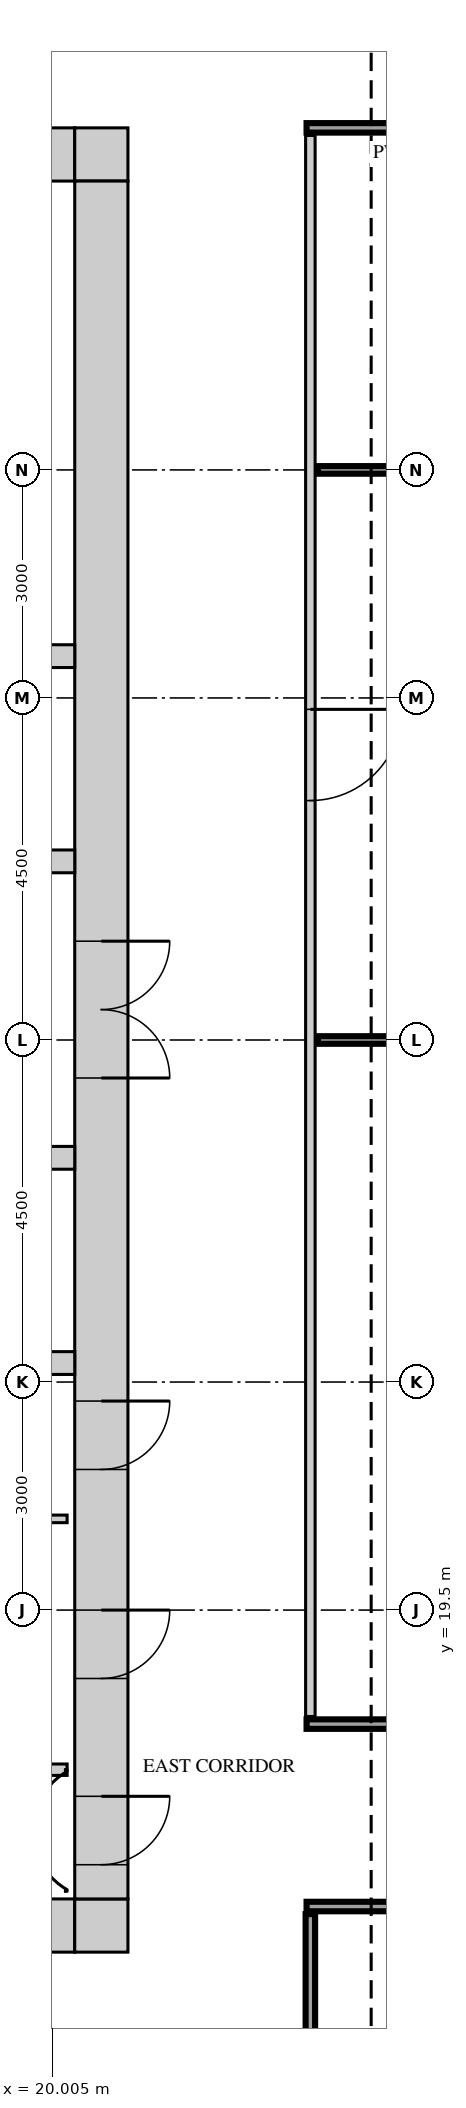
"""IFC4 building model, lengths in metres.
Left out: names, types, materials, properties, quantities, classifications, styles, units other than length and angle.
Written with IfcOpenShell. Run it as: python <this file> out.ifc"""

import sys

from ifc_helpers import new_model, si_unit, direction, frame, frame_2d, origin, place, context, subcontext, project, spatial, rectangle, extrude, source, transform, mapped, element, fill, save


model = new_model("IFC4")
c1 = context("Model", 3, precision=1e-05, world=origin(), true_north=direction((0.0, 1.0)))
c2 = subcontext(c1, "Body", "Model", "MODEL_VIEW")
j1 = project(units=[si_unit("LENGTHUNIT", "METRE"), si_unit("PLANEANGLEUNIT", "RADIAN")], contexts=[c1])
p1 = place(None, origin())
s1 = spatial("IfcSite", under=j1, at=p1, CompositionType="ELEMENT")
p2 = place(p1, origin())
s2 = spatial("IfcBuilding", under=s1, at=p2, CompositionType="ELEMENT")
p3 = place(p2, frame((0.0, 0.0, 246.2)))
s3 = spatial("IfcBuildingStorey", under=s2, at=p3, CompositionType="ELEMENT", Elevation=246.2)
m1 = source(origin(), c2, "Body", "SweptSolid", [
    extrude(rectangle(XDim=13.6, YDim=0.7, at=frame_2d((6.8, 0.0))), origin(), (0.0, 0.0, 1.0), 3.75),
])
p4 = place(p3, frame((6.7, 38.65, 0.0), z_axis=(0.0, 0.0, 1.0), x_axis=(1.0, 0.0, 0.0)))
e1 = element("IfcWall", 1, at=p4, inside=s3, PredefinedType="SHEAR", context=c2, shape_type="MappedRepresentation", body=[
    mapped(m1, transform((0.0, 0.0, 0.0))),
])
m2 = source(origin(), c2, "Body", "SweptSolid", [
    extrude(rectangle(XDim=0.9, YDim=2.1, at=frame_2d((0.45, 1.05))), frame((0.0, 0.36, 0.0), z_axis=(0.0, -1.0, 0.0), x_axis=(1.0, 0.0, 0.0)), (0.0, 0.0, 1.0), 0.72),
])
p5 = place(p4, frame((3.0, 0.0, 0.0)))
e2 = element("IfcOpeningElement", 2, at=p5, cuts=e1, PredefinedType="OPENING", context=c2, shape_type="MappedRepresentation", body=[
    mapped(m2, transform((0.0, 0.0, 0.0))),
])
p6 = place(p4, frame((9.7, 0.0, 0.0)))
e3 = element("IfcOpeningElement", 3, at=p6, cuts=e1, PredefinedType="OPENING", context=c2, shape_type="MappedRepresentation", body=[
    mapped(m2, transform((0.0, 0.0, 0.0))),
])
m3 = source(origin(), c2, "Body", "SweptSolid", [
    extrude(rectangle(XDim=0.7, YDim=0.7, at=frame_2d((0.35, 0.0))), origin(), (0.0, 0.0, 1.0), 3.75),
])
p7 = place(p3, frame((20.3, 38.65, 0.0), z_axis=(0.0, 0.0, 1.0), x_axis=(1.0, 0.0, 0.0)))
e4 = element("IfcWall", 4, at=p7, inside=s3, PredefinedType="SHEAR", context=c2, shape_type="MappedRepresentation", body=[
    mapped(m3, transform((0.0, 0.0, 0.0))),
])
p8 = place(p3, frame((6.7, 15.35, 0.0), z_axis=(0.0, 0.0, 1.0), x_axis=(1.0, 0.0, 0.0)))
e5 = element("IfcWall", 5, at=p8, inside=s3, PredefinedType="SHEAR", context=c2, shape_type="MappedRepresentation", body=[
    mapped(m1, transform((0.0, 0.0, 0.0))),
])
m4 = source(origin(), c2, "Body", "SweptSolid", [
    extrude(rectangle(XDim=1.2, YDim=2.1, at=frame_2d((0.6, 1.05))), frame((0.0, 0.36, 0.0), z_axis=(0.0, -1.0, 0.0), x_axis=(1.0, 0.0, 0.0)), (0.0, 0.0, 1.0), 0.72),
])
p9 = place(p8, frame((5.5, 0.0, 0.0)))
e6 = element("IfcOpeningElement", 6, at=p9, cuts=e5, PredefinedType="OPENING", context=c2, shape_type="MappedRepresentation", body=[
    mapped(m4, transform((0.0, 0.0, 0.0))),
])
p10 = place(p8, frame((2.15, 0.0, 0.0)))
e7 = element("IfcOpeningElement", 7, at=p10, cuts=e5, PredefinedType="OPENING", context=c2, shape_type="MappedRepresentation", body=[
    mapped(m4, transform((0.0, 0.0, 0.0))),
])
m5 = source(origin(), c2, "Body", "SweptSolid", [
    extrude(rectangle(XDim=1.0, YDim=2.1, at=frame_2d((0.5, 1.05))), frame((0.0, 0.36, 0.0), z_axis=(0.0, -1.0, 0.0), x_axis=(1.0, 0.0, 0.0)), (0.0, 0.0, 1.0), 0.72),
])
p11 = place(p8, frame((8.0, 0.0, 0.0)))
e8 = element("IfcOpeningElement", 8, at=p11, cuts=e5, PredefinedType="OPENING", context=c2, shape_type="MappedRepresentation", body=[
    mapped(m5, transform((0.0, 0.0, 0.0))),
])
p12 = place(p3, frame((20.3, 15.35, 0.0), z_axis=(0.0, 0.0, 1.0), x_axis=(1.0, 0.0, 0.0)))
e9 = element("IfcWall", 9, at=p12, inside=s3, PredefinedType="SHEAR", context=c2, shape_type="MappedRepresentation", body=[
    mapped(m3, transform((0.0, 0.0, 0.0))),
])
m6 = source(origin(), c2, "Body", "SweptSolid", [
    extrude(rectangle(XDim=22.6, YDim=0.7, at=frame_2d((11.3, 0.0))), origin(), (0.0, 0.0, 1.0), 3.75),
])
p13 = place(p3, frame((20.65, 15.7, 0.0), z_axis=(0.0, 0.0, 1.0), x_axis=(0.0, 1.0, 0.0)))
e10 = element("IfcWall", 10, at=p13, inside=s3, PredefinedType="SHEAR", context=c2, shape_type="MappedRepresentation", body=[
    mapped(m6, transform((0.0, 0.0, 0.0))),
])
m7 = source(origin(), c2, "Body", "SweptSolid", [
    extrude(rectangle(XDim=1.8, YDim=2.1, at=frame_2d((0.9, 1.05))), frame((0.0, 0.36, 0.0), z_axis=(0.0, -1.0, 0.0), x_axis=(1.0, 0.0, 0.0)), (0.0, 0.0, 1.0), 0.72),
])
p14 = place(p13, frame((10.8, 0.0, 0.0)))
e11 = element("IfcOpeningElement", 11, at=p14, cuts=e10, PredefinedType="OPENING", context=c2, shape_type="MappedRepresentation", body=[
    mapped(m7, transform((0.0, 0.0, 0.0))),
])
p15 = place(p13, frame((0.45, 0.0, 0.0)))
e12 = element("IfcOpeningElement", 12, at=p15, cuts=e10, PredefinedType="OPENING", context=c2, shape_type="MappedRepresentation", body=[
    mapped(m2, transform((0.0, 0.0, 0.0))),
])
p16 = place(p13, frame((2.9, 0.0, 0.0)))
e13 = element("IfcOpeningElement", 13, at=p16, cuts=e10, PredefinedType="OPENING", context=c2, shape_type="MappedRepresentation", body=[
    mapped(m2, transform((0.0, 0.0, 0.0))),
])
p17 = place(p13, frame((5.65, 0.0, 0.0)))
e14 = element("IfcOpeningElement", 14, at=p17, cuts=e10, PredefinedType="OPENING", context=c2, shape_type="MappedRepresentation", body=[
    mapped(m2, transform((0.0, 0.0, 0.0))),
])
m8 = source(origin(), c2, "Body", "SweptSolid", [
    extrude(rectangle(XDim=13.6, YDim=0.3, at=frame_2d((6.8, 0.0))), origin(), (0.0, 0.0, 1.0), 3.75),
])
for number, where, z_axis, x_axis in (
    (15, (6.7, 22.75, 0.0), (0.0, 0.0, 1.0), (1.0, 0.0, 0.0)),
    (16, (6.7, 32.05, 0.0), (0.0, 0.0, 1.0), (1.0, 0.0, 0.0)),
):
    element("IfcWall", number, at=place(p3, frame(where, z_axis=z_axis, x_axis=x_axis)), inside=s3, PredefinedType="STANDARD", context=c2, shape_type="MappedRepresentation", body=[
        mapped(m8, transform((0.0, 0.0, 0.0))),
    ])
p18 = place(p3, frame((6.7, 29.35, 0.0), z_axis=(0.0, 0.0, 1.0), x_axis=(1.0, 0.0, 0.0)))
e17 = element("IfcWall", 17, at=p18, inside=s3, PredefinedType="STANDARD", context=c2, shape_type="MappedRepresentation", body=[
    mapped(m8, transform((0.0, 0.0, 0.0))),
])
m9 = source(origin(), c2, "Body", "SweptSolid", [
    extrude(rectangle(XDim=1.2, YDim=2.1, at=frame_2d((0.6, 1.05))), frame((0.0, 0.16, 0.0), z_axis=(0.0, -1.0, 0.0), x_axis=(1.0, 0.0, 0.0)), (0.0, 0.0, 1.0), 0.32),
])
p19 = place(p18, frame((1.05, 0.0, 0.0)))
e18 = element("IfcOpeningElement", 18, at=p19, cuts=e17, PredefinedType="OPENING", context=c2, shape_type="MappedRepresentation", body=[
    mapped(m9, transform((0.0, 0.0, 0.0))),
])
p20 = place(p18, frame((3.6, 0.0, 0.0)))
e19 = element("IfcOpeningElement", 19, at=p20, cuts=e17, PredefinedType="OPENING", context=c2, shape_type="MappedRepresentation", body=[
    mapped(m9, transform((0.0, 0.0, 0.0))),
])
p21 = place(p18, frame((6.15, 0.0, 0.0)))
e20 = element("IfcOpeningElement", 20, at=p21, cuts=e17, PredefinedType="OPENING", context=c2, shape_type="MappedRepresentation", body=[
    mapped(m9, transform((0.0, 0.0, 0.0))),
])
p22 = place(p18, frame((8.7, 0.0, 0.0)))
e21 = element("IfcOpeningElement", 21, at=p22, cuts=e17, PredefinedType="OPENING", context=c2, shape_type="MappedRepresentation", body=[
    mapped(m9, transform((0.0, 0.0, 0.0))),
])
p23 = place(p18, frame((11.25, 0.0, 0.0)))
e22 = element("IfcOpeningElement", 22, at=p23, cuts=e17, PredefinedType="OPENING", context=c2, shape_type="MappedRepresentation", body=[
    mapped(m9, transform((0.0, 0.0, 0.0))),
])
p24 = place(p3, frame((6.7, 25.45, 0.0), z_axis=(0.0, 0.0, 1.0), x_axis=(1.0, 0.0, 0.0)))
e23 = element("IfcWall", 23, at=p24, inside=s3, PredefinedType="STANDARD", context=c2, shape_type="MappedRepresentation", body=[
    mapped(m8, transform((0.0, 0.0, 0.0))),
])
p25 = place(p24, frame((1.05, 0.0, 0.0)))
e24 = element("IfcOpeningElement", 24, at=p25, cuts=e23, PredefinedType="OPENING", context=c2, shape_type="MappedRepresentation", body=[
    mapped(m9, transform((0.0, 0.0, 0.0))),
])
p26 = place(p24, frame((3.6, 0.0, 0.0)))
e25 = element("IfcOpeningElement", 25, at=p26, cuts=e23, PredefinedType="OPENING", context=c2, shape_type="MappedRepresentation", body=[
    mapped(m9, transform((0.0, 0.0, 0.0))),
])
p27 = place(p24, frame((6.15, 0.0, 0.0)))
e26 = element("IfcOpeningElement", 26, at=p27, cuts=e23, PredefinedType="OPENING", context=c2, shape_type="MappedRepresentation", body=[
    mapped(m9, transform((0.0, 0.0, 0.0))),
])
p28 = place(p24, frame((8.7, 0.0, 0.0)))
e27 = element("IfcOpeningElement", 27, at=p28, cuts=e23, PredefinedType="OPENING", context=c2, shape_type="MappedRepresentation", body=[
    mapped(m9, transform((0.0, 0.0, 0.0))),
])
p29 = place(p24, frame((11.25, 0.0, 0.0)))
e28 = element("IfcOpeningElement", 28, at=p29, cuts=e23, PredefinedType="OPENING", context=c2, shape_type="MappedRepresentation", body=[
    mapped(m9, transform((0.0, 0.0, 0.0))),
])
m10 = source(origin(), c2, "Body", "SweptSolid", [
    extrude(rectangle(XDim=10.85, YDim=0.125, at=frame_2d((5.425, 0.0))), origin(), (0.0, 0.0, 1.0), 3.8),
])
p30 = place(p3, frame((23.4, 4.65, 0.0), z_axis=(0.0, 0.0, 1.0), x_axis=(0.0, 1.0, 0.0)))
e29 = element("IfcWall", 29, at=p30, inside=s3, PredefinedType="PARTITIONING", context=c2, shape_type="MappedRepresentation", body=[
    mapped(m10, transform((0.0, 0.0, 0.0))),
])
m11 = source(origin(), c2, "Body", "SweptSolid", [
    extrude(rectangle(XDim=0.9, YDim=2.1, at=frame_2d((0.45, 1.05))), frame((0.0, 0.073, 0.0), z_axis=(0.0, -1.0, 0.0), x_axis=(1.0, 0.0, 0.0)), (0.0, 0.0, 1.0), 0.145),
])
p31 = place(p30, frame((4.5, 0.0, 0.0)))
e30 = element("IfcOpeningElement", 30, at=p31, cuts=e29, PredefinedType="OPENING", context=c2, shape_type="MappedRepresentation", body=[
    mapped(m11, transform((0.0, 0.0, 0.0))),
])
m12 = source(origin(), c2, "Body", "SweptSolid", [
    extrude(rectangle(XDim=26.0, YDim=0.125, at=frame_2d((13.0, 0.0))), origin(), (0.0, 0.0, 1.0), 3.8),
])
p32 = place(p3, frame((23.35, 15.6, 0.0), z_axis=(0.0, 0.0, 1.0), x_axis=(1.0, 0.0, 0.0)))
e31 = element("IfcWall", 31, at=p32, inside=s3, PredefinedType="PARTITIONING", context=c2, shape_type="MappedRepresentation", body=[
    mapped(m12, transform((0.0, 0.0, 0.0))),
])
p33 = place(p32, frame((4.05, 0.0, 0.0)))
e32 = element("IfcOpeningElement", 32, at=p33, cuts=e31, PredefinedType="OPENING", context=c2, shape_type="MappedRepresentation", body=[
    mapped(m11, transform((0.0, 0.0, 0.0))),
])
m13 = source(origin(), c2, "Body", "SweptSolid", [
    extrude(rectangle(XDim=1.0, YDim=2.1, at=frame_2d((0.5, 1.05))), frame((0.0, 0.073, 0.0), z_axis=(0.0, -1.0, 0.0), x_axis=(1.0, 0.0, 0.0)), (0.0, 0.0, 1.0), 0.145),
])
p34 = place(p32, frame((6.85, 0.0, 0.0)))
e33 = element("IfcOpeningElement", 33, at=p34, cuts=e31, PredefinedType="OPENING", context=c2, shape_type="MappedRepresentation", body=[
    mapped(m13, transform((0.0, 0.0, 0.0))),
])
p35 = place(p32, frame((9.25, 0.0, 0.0)))
e34 = element("IfcOpeningElement", 34, at=p35, cuts=e31, PredefinedType="OPENING", context=c2, shape_type="MappedRepresentation", body=[
    mapped(m11, transform((0.0, 0.0, 0.0))),
])
m14 = source(origin(), c2, "Body", "SweptSolid", [
    extrude(rectangle(XDim=1.2, YDim=2.1, at=frame_2d((0.6, 1.05))), frame((0.0, 0.073, 0.0), z_axis=(0.0, -1.0, 0.0), x_axis=(1.0, 0.0, 0.0)), (0.0, 0.0, 1.0), 0.145),
])
p36 = place(p32, frame((18.05, 0.0, 0.0)))
e35 = element("IfcOpeningElement", 35, at=p36, cuts=e31, PredefinedType="OPENING", context=c2, shape_type="MappedRepresentation", body=[
    mapped(m14, transform((0.0, 0.0, 0.0))),
])
m15 = source(origin(), c2, "Body", "SweptSolid", [
    extrude(rectangle(XDim=4.0, YDim=0.15, at=frame_2d((2.0, 0.0))), origin(), (0.0, 0.0, 1.0), 3.8),
])
p37 = place(p3, frame((16.2, 17.4, 0.0), z_axis=(0.0, 0.0, 1.0), x_axis=(1.0, 0.0, 0.0)))
e36 = element("IfcWall", 36, at=p37, inside=s3, PredefinedType="PARTITIONING", context=c2, shape_type="MappedRepresentation", body=[
    mapped(m15, transform((0.0, 0.0, 0.0))),
])
p38 = place(p3, frame((23.35, 18.0, 0.0), z_axis=(0.0, 0.0, 1.0), x_axis=(1.0, 0.0, 0.0)))
e37 = element("IfcWall", 37, at=p38, inside=s3, PredefinedType="PARTITIONING", context=c2, shape_type="MappedRepresentation", body=[
    mapped(m12, transform((0.0, 0.0, 0.0))),
])
p39 = place(p38, frame((12.5, 0.0, 0.0)))
e38 = element("IfcOpeningElement", 38, at=p39, cuts=e37, PredefinedType="OPENING", context=c2, shape_type="MappedRepresentation", body=[
    mapped(m14, transform((0.0, 0.0, 0.0))),
])
m16 = source(origin(), c2, "Body", "SweptSolid", [
    extrude(rectangle(XDim=20.8, YDim=0.125, at=frame_2d((10.4, 0.0))), origin(), (0.0, 0.0, 1.0), 3.8),
])
p40 = place(p3, frame((23.4, 18.1, 0.0), z_axis=(0.0, 0.0, 1.0), x_axis=(0.0, 1.0, 0.0)))
e39 = element("IfcWall", 39, at=p40, inside=s3, PredefinedType="PARTITIONING", context=c2, shape_type="MappedRepresentation", body=[
    mapped(m16, transform((0.0, 0.0, 0.0))),
])
p41 = place(p40, frame((12.05, 0.0, 0.0)))
e40 = element("IfcOpeningElement", 40, at=p41, cuts=e39, PredefinedType="OPENING", context=c2, shape_type="MappedRepresentation", body=[
    mapped(m14, transform((0.0, 0.0, 0.0))),
])
m17 = source(origin(), c2, "Body", "SweptSolid", [
    extrude(rectangle(XDim=4.1, YDim=0.1, at=frame_2d((2.05, 0.0))), origin(), (0.0, 0.0, 1.0), 3.8),
])
p42 = place(p3, frame((16.1, 20.7, 0.0), z_axis=(0.0, 0.0, 1.0), x_axis=(1.0, 0.0, 0.0)))
e41 = element("IfcWall", 41, at=p42, inside=s3, PredefinedType="PARTITIONING", context=c2, shape_type="MappedRepresentation", body=[
    mapped(m17, transform((0.0, 0.0, 0.0))),
])
m18 = source(origin(), c2, "Body", "SweptSolid", [
    extrude(rectangle(XDim=25.85, YDim=0.1, at=frame_2d((12.925, 0.0))), origin(), (0.0, 0.0, 1.0), 3.8),
])
for number, where, z_axis, x_axis in (
    (42, (23.5, 27.0, 0.0), (0.0, 0.0, 1.0), (1.0, 0.0, 0.0)),
    (43, (23.5, 34.5, 0.0), (0.0, 0.0, 1.0), (1.0, 0.0, 0.0)),
):
    element("IfcWall", number, at=place(p3, frame(where, z_axis=z_axis, x_axis=x_axis)), inside=s3, PredefinedType="PARTITIONING", context=c2, shape_type="MappedRepresentation", body=[
        mapped(m18, transform((0.0, 0.0, 0.0))),
    ])
m19 = source(origin(), c2, "Body", "SweptSolid", [
    extrude(rectangle(XDim=7.1, YDim=0.125, at=frame_2d((3.55, 0.0))), origin(), (0.0, 0.0, 1.0), 3.8),
])
p43 = place(p3, frame((23.35, 39.0, 0.0), z_axis=(0.0, 0.0, 1.0), x_axis=(1.0, 0.0, 0.0)))
e44 = element("IfcWall", 44, at=p43, inside=s3, PredefinedType="PARTITIONING", context=c2, shape_type="MappedRepresentation", body=[
    mapped(m19, transform((0.0, 0.0, 0.0))),
])
p44 = place(p43, frame((2.95, 0.0, 0.0)))
e45 = element("IfcOpeningElement", 45, at=p44, cuts=e44, PredefinedType="OPENING", context=c2, shape_type="MappedRepresentation", body=[
    mapped(m14, transform((0.0, 0.0, 0.0))),
])
m20 = source(origin(), c2, "Body", "SweptSolid", [
    extrude(rectangle(XDim=1.8, YDim=2.1, at=frame_2d((0.9, 1.05))), frame((0.0, 0.3, 0.0), z_axis=(0.0, -1.0, 0.0), x_axis=(1.0, 0.0, 0.0)), (0.0, 0.0, 1.0), 0.6),
])
p45 = place(p14, origin())
e46 = element("IfcDoor", 46, at=p45, inside=s3, OperationType="DOUBLE_DOOR_SINGLE_SWING", PredefinedType="DOOR", context=c2, shape_type="MappedRepresentation", body=[
    mapped(m20, transform((0.0, 0.0, 0.0))),
])
fill(e11, e46)
m21 = source(origin(), c2, "Body", "SweptSolid", [
    extrude(rectangle(XDim=0.9, YDim=2.1, at=frame_2d((0.45, 1.05))), frame((0.0, 0.3, 0.0), z_axis=(0.0, -1.0, 0.0), x_axis=(1.0, 0.0, 0.0)), (0.0, 0.0, 1.0), 0.6),
])
p46 = place(p15, origin())
e47 = element("IfcDoor", 47, at=p46, inside=s3, OperationType="SINGLE_SWING_RIGHT", PredefinedType="DOOR", context=c2, shape_type="MappedRepresentation", body=[
    mapped(m21, transform((0.0, 0.0, 0.0))),
])
fill(e12, e47)
p47 = place(p16, origin())
e48 = element("IfcDoor", 48, at=p47, inside=s3, OperationType="SINGLE_SWING_RIGHT", PredefinedType="DOOR", context=c2, shape_type="MappedRepresentation", body=[
    mapped(m21, transform((0.0, 0.0, 0.0))),
])
fill(e13, e48)
p48 = place(p17, origin())
e49 = element("IfcDoor", 49, at=p48, inside=s3, OperationType="SINGLE_SWING_RIGHT", PredefinedType="DOOR", context=c2, shape_type="MappedRepresentation", body=[
    mapped(m21, transform((0.0, 0.0, 0.0))),
])
fill(e14, e49)
m22 = source(origin(), c2, "Body", "SweptSolid", [
    extrude(rectangle(XDim=1.2, YDim=2.1, at=frame_2d((0.6, 1.05))), frame((0.0, 0.025, 0.0), z_axis=(0.0, -1.0, 0.0), x_axis=(1.0, 0.0, 0.0)), (0.0, 0.0, 1.0), 0.05),
])
p49 = place(p41, origin())
e50 = element("IfcDoor", 50, at=p49, inside=s3, OperationType="SINGLE_SWING_RIGHT", PredefinedType="DOOR", context=c2, shape_type="MappedRepresentation", body=[
    mapped(m22, transform((0.0, 0.0, 0.0))),
])
fill(e40, e50)
save(model, sys.argv[1])
